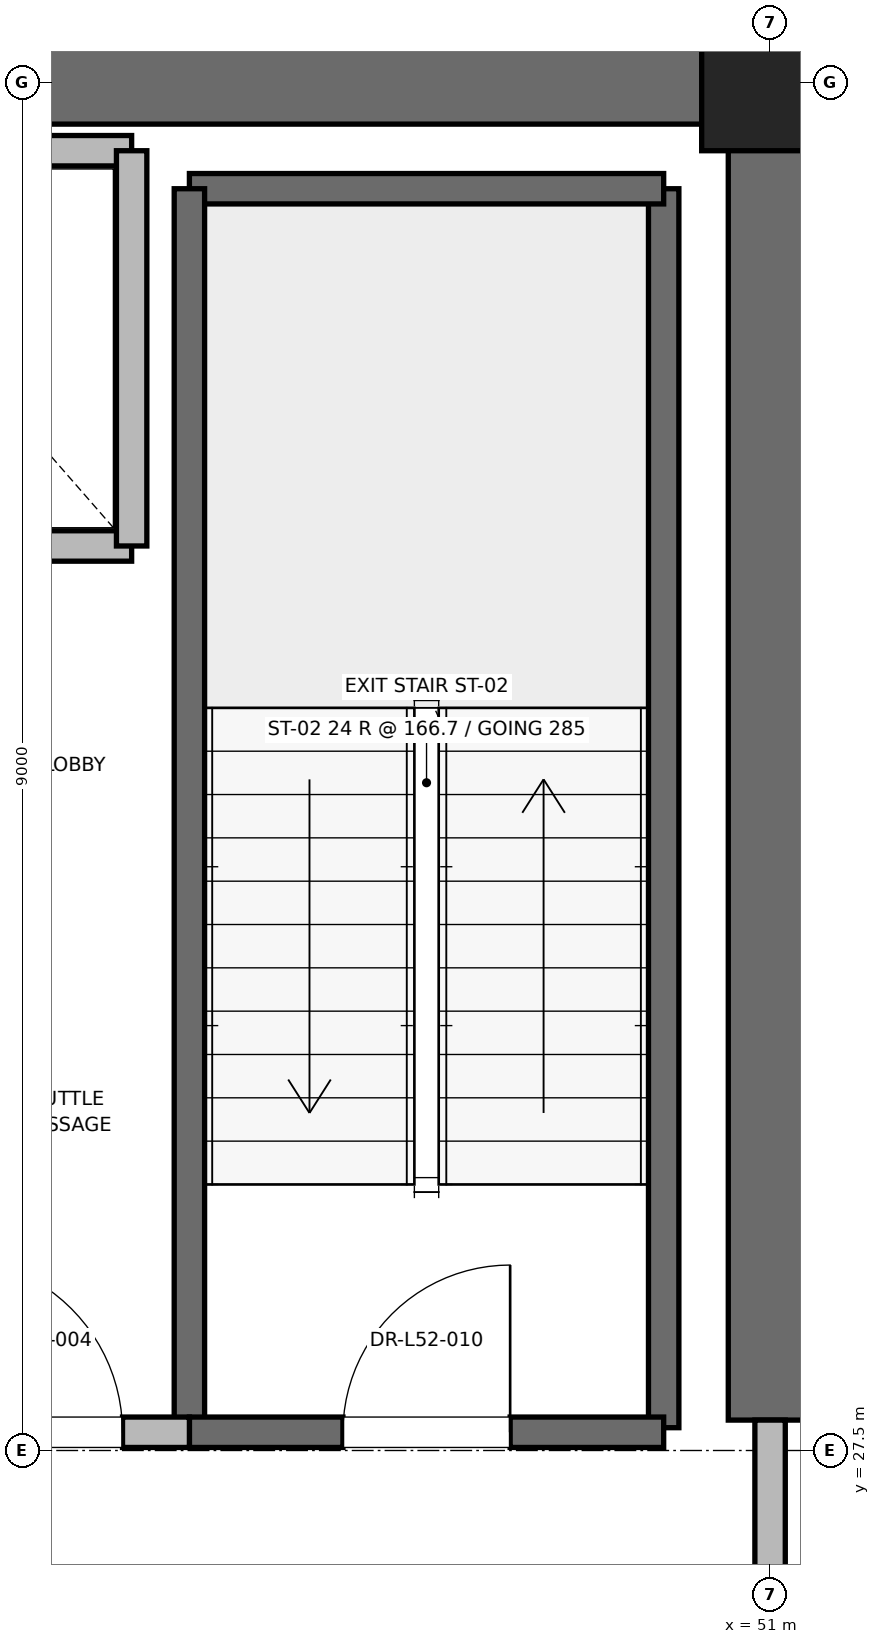
"""IFC4 building model, lengths in metres.
Left out: names, types, materials, properties, quantities, classifications, styles, units other than length and angle.
Written with IfcOpenShell. Run it as: python <this file> out.ifc"""

import sys

from ifc_helpers import new_model, si_unit, direction, frame, frame_2d, origin, origin_2d, place, context, subcontext, project, spatial, rectangle, extrude, element, fill, save


model = new_model("IFC4")
c1 = context("Model", 3, precision=1e-05, world=origin(), true_north=direction((0.0, 1.0)))
c2 = subcontext(c1, "Body", "Model", "MODEL_VIEW")
j1 = project(units=[si_unit("LENGTHUNIT", "METRE"), si_unit("PLANEANGLEUNIT", "RADIAN")], contexts=[c1])
p1 = place(None, origin())
s1 = spatial("IfcSite", under=j1, at=p1, CompositionType="ELEMENT")
p2 = place(p1, origin())
s2 = spatial("IfcBuilding", under=s1, at=p2, CompositionType="ELEMENT")
p3 = place(p2, frame((0.0, 0.0, 225.2)))
s3 = spatial("IfcBuildingStorey", under=s2, at=p3, CompositionType="ELEMENT", Elevation=225.2)
p4 = place(p3, frame((51.0, 36.5, 0.0), z_axis=(0.0, 0.0, 1.0), x_axis=(1.0, 0.0, 0.0)))
e1 = element("IfcColumn", 1, at=p4, inside=s3, PredefinedType="PILASTER", context=c2, shape_type="SweptSolid", body=[
    extrude(rectangle(XDim=0.9, YDim=0.9, at=origin_2d()), origin(), (0.0, 0.0, 1.0), 4.0),
])
p5 = place(p3, frame((45.2, 36.5, 0.0), z_axis=(0.0, 0.0, 1.0), x_axis=(1.0, 0.0, 0.0)))
e2 = element("IfcWall", 2, at=p5, inside=s3, PredefinedType="SHEAR", context=c2, shape_type="SweptSolid", body=[
    extrude(rectangle(XDim=5.8, YDim=0.55, at=frame_2d((2.9, 0.0))), origin(), (0.0, 0.0, 1.0), 3.775),
])
p6 = place(p3, frame((51.0, 27.7, 0.0), z_axis=(0.0, 0.0, 1.0), x_axis=(0.0, 1.0, 0.0)))
e3 = element("IfcWall", 3, at=p6, inside=s3, PredefinedType="SHEAR", context=c2, shape_type="SweptSolid", body=[
    extrude(rectangle(XDim=8.8, YDim=0.55, at=frame_2d((4.4, 0.0))), origin(), (0.0, 0.0, 1.0), 3.775),
])
p7 = place(p3, frame((50.3, 27.65, 0.0), z_axis=(0.0, 0.0, 1.0), x_axis=(0.0, 1.0, 0.0)))
e4 = element("IfcWall", 4, at=p7, inside=s3, PredefinedType="SOLIDWALL", context=c2, shape_type="SweptSolid", body=[
    extrude(rectangle(XDim=8.15, YDim=0.2, at=frame_2d((4.075, 0.0))), origin(), (0.0, 0.0, 1.0), 3.775),
])
p8 = place(p3, frame((47.18, 35.8, 0.0), z_axis=(0.0, 0.0, 1.0), x_axis=(1.0, 0.0, 0.0)))
e5 = element("IfcWall", 5, at=p8, inside=s3, PredefinedType="SOLIDWALL", context=c2, shape_type="SweptSolid", body=[
    extrude(rectangle(XDim=3.12, YDim=0.2, at=frame_2d((1.56, 0.0))), origin(), (0.0, 0.0, 1.0), 3.775),
])
p9 = place(p3, frame((47.18, 27.62, 0.0), z_axis=(0.0, 0.0, 1.0), x_axis=(0.0, 1.0, 0.0)))
e6 = element("IfcWall", 6, at=p9, inside=s3, PredefinedType="SOLIDWALL", context=c2, shape_type="SweptSolid", body=[
    extrude(rectangle(XDim=8.18, YDim=0.2, at=frame_2d((4.09, 0.0))), origin(), (0.0, 0.0, 1.0), 3.775),
])
p10 = place(p3, frame((47.18, 27.62, 0.0), z_axis=(0.0, 0.0, 1.0), x_axis=(1.0, 0.0, 0.0)))
e7 = element("IfcWall", 7, at=p10, inside=s3, PredefinedType="SOLIDWALL", context=c2, shape_type="SweptSolid", body=[
    extrude(rectangle(XDim=3.12, YDim=0.2, at=frame_2d((1.56, 0.0))), origin(), (0.0, 0.0, 1.0), 3.775),
])
p11 = place(p10, frame((1.01, 0.0, 0.0)))
e8 = element("IfcOpeningElement", 8, at=p11, cuts=e7, PredefinedType="OPENING", context=c2, shape_type="SweptSolid", body=[
    extrude(rectangle(XDim=1.1, YDim=2.15, at=frame_2d((0.55, 1.075))), frame((0.0, 0.1, 0.0), z_axis=(0.0, -1.0, 0.0), x_axis=(1.0, 0.0, 0.0)), (0.0, 0.0, 1.0), 0.2),
])
p12 = place(p3, frame((45.15, 27.62, 0.0), z_axis=(0.0, 0.0, 1.0), x_axis=(1.0, 0.0, 0.0)))
e9 = element("IfcWall", 9, at=p12, inside=s3, PredefinedType="PARTITIONING", context=c2, shape_type="SweptSolid", body=[
    extrude(rectangle(XDim=2.03, YDim=0.2, at=frame_2d((1.015, 0.0))), origin(), (0.0, 0.0, 1.0), 3.775),
])
p13 = place(p12, frame((0.44, 0.0, 0.0)))
e10 = element("IfcOpeningElement", 10, at=p13, cuts=e9, PredefinedType="OPENING", context=c2, shape_type="SweptSolid", body=[
    extrude(rectangle(XDim=1.15, YDim=2.2, at=frame_2d((0.575, 1.1))), frame((0.0, 0.1, 0.0), z_axis=(0.0, -1.0, 0.0), x_axis=(1.0, 0.0, 0.0)), (0.0, 0.0, 1.0), 0.2),
])
p14 = place(p3, frame((51.0, 24.3, 0.0), z_axis=(0.0, 0.0, 1.0), x_axis=(0.0, 1.0, 0.0)))
e11 = element("IfcWall", 11, at=p14, inside=s3, PredefinedType="PARTITIONING", context=c2, shape_type="SweptSolid", body=[
    extrude(rectangle(XDim=3.4, YDim=0.2, at=frame_2d((1.7, 0.0))), origin(), (0.0, 0.0, 1.0), 2.755),
])
p15 = place(p14, frame((1.125, 0.0, 0.0)))
e12 = element("IfcOpeningElement", 12, at=p15, cuts=e11, PredefinedType="OPENING", context=c2, shape_type="SweptSolid", body=[
    extrude(rectangle(XDim=1.15, YDim=2.2, at=frame_2d((0.575, 1.1))), frame((0.0, 0.1, 0.0), z_axis=(0.0, -1.0, 0.0), x_axis=(1.0, 0.0, 0.0)), (0.0, 0.0, 1.0), 0.2),
])
p16 = place(p3, frame((44.5, 33.45, 0.0), z_axis=(0.0, 0.0, 1.0), x_axis=(1.0, 0.0, 0.0)))
e13 = element("IfcWall", 13, at=p16, inside=s3, PredefinedType="SOLIDWALL", context=c2, shape_type="SweptSolid", body=[
    extrude(rectangle(XDim=2.3, YDim=0.2, at=frame_2d((1.15, 0.0))), origin(), (0.0, 0.0, 1.0), 3.775),
])
p17 = place(p3, frame((46.8, 36.05, 0.0), z_axis=(0.0, 0.0, 1.0), x_axis=(-1.0, 0.0, 0.0)))
e14 = element("IfcWall", 14, at=p17, inside=s3, PredefinedType="SOLIDWALL", context=c2, shape_type="SweptSolid", body=[
    extrude(rectangle(XDim=2.3, YDim=0.2, at=frame_2d((1.15, 0.0))), origin(), (0.0, 0.0, 1.0), 2.755),
])
p18 = place(p3, frame((46.8, 33.45, 0.0), z_axis=(0.0, 0.0, 1.0), x_axis=(0.0, 1.0, 0.0)))
e15 = element("IfcWall", 15, at=p18, inside=s3, PredefinedType="SOLIDWALL", context=c2, shape_type="SweptSolid", body=[
    extrude(rectangle(XDim=2.6, YDim=0.2, at=frame_2d((1.3, 0.0))), origin(), (0.0, 0.0, 1.0), 3.775),
])
p19 = place(p11, origin())
e16 = element("IfcDoor", 16, at=p19, inside=s3, OperationType="SINGLE_SWING_RIGHT", PredefinedType="DOOR", context=c2, shape_type="SweptSolid", body=[
    extrude(rectangle(XDim=1.1, YDim=2.15, at=frame_2d((0.55, 1.075))), frame((0.0, 0.025, 0.0), z_axis=(0.0, -1.0, 0.0), x_axis=(1.0, 0.0, 0.0)), (0.0, 0.0, 1.0), 0.05),
])
fill(e8, e16)
p20 = place(p13, origin())
e17 = element("IfcDoor", 17, at=p20, inside=s3, OperationType="SINGLE_SWING_LEFT", PredefinedType="DOOR", context=c2, shape_type="SweptSolid", body=[
    extrude(rectangle(XDim=1.15, YDim=2.2, at=frame_2d((0.575, 1.1))), frame((0.0, 0.025, 0.0), z_axis=(0.0, -1.0, 0.0), x_axis=(1.0, 0.0, 0.0)), (0.0, 0.0, 1.0), 0.05),
])
fill(e10, e17)
save(model, sys.argv[1])
